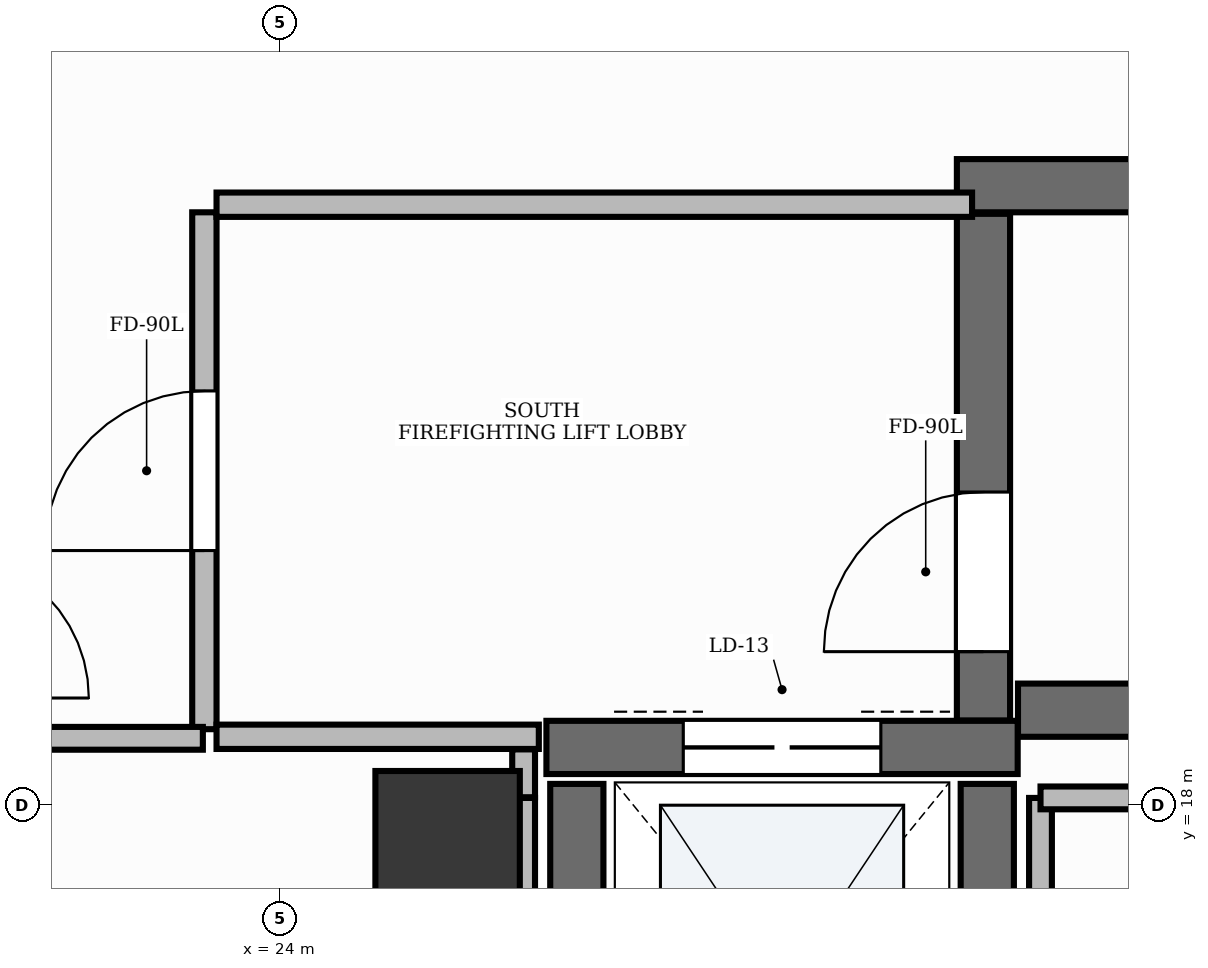
"""IFC4 building model, lengths in metres.
Left out: names, types, materials, properties, quantities, classifications, styles, units other than length and angle.
Written with IfcOpenShell. Run it as: python <this file> out.ifc"""

import sys

from ifc_helpers import new_model, si_unit, direction, frame, frame_2d, origin, origin_2d, place, context, subcontext, project, spatial, rectangle, extrude, element, fill, save


model = new_model("IFC4")
c1 = context("Model", 3, precision=1e-05, world=origin(), true_north=direction((0.0, 1.0)))
c2 = subcontext(c1, "Body", "Model", "MODEL_VIEW")
j1 = project(units=[si_unit("LENGTHUNIT", "METRE"), si_unit("PLANEANGLEUNIT", "RADIAN")], contexts=[c1])
p1 = place(None, origin())
s1 = spatial("IfcSite", under=j1, at=p1, CompositionType="ELEMENT")
p2 = place(p1, origin())
s2 = spatial("IfcBuilding", under=s1, at=p2, CompositionType="ELEMENT")
p3 = place(p2, frame((0.0, 0.0, 322.8)))
s3 = spatial("IfcBuildingStorey", under=s2, at=p3, CompositionType="ELEMENT", Elevation=322.8)
p4 = place(p3, frame((28.852, 18.625, 0.0), z_axis=(0.0, 0.0, 1.0), x_axis=(1.0, 0.0, 0.0)))
e1 = element("IfcWall", 1, at=p4, inside=s3, PredefinedType="SHEAR", context=c2, shape_type="SweptSolid", body=[
    extrude(rectangle(XDim=8.148, YDim=0.35, at=frame_2d((4.074, 0.0))), origin(), (0.0, 0.0, 1.0), 3.9),
])
p5 = place(p3, frame((28.45, 22.075, 0.0), z_axis=(0.0, 0.0, 1.0), x_axis=(1.0, 0.0, 0.0)))
e2 = element("IfcWall", 2, at=p5, inside=s3, PredefinedType="SHEAR", context=c2, shape_type="SweptSolid", body=[
    extrude(rectangle(XDim=8.55, YDim=0.35, at=frame_2d((4.275, 0.0))), origin(), (0.0, 0.0, 1.0), 3.9),
])
p6 = place(p3, frame((28.625, 18.557, 0.0), z_axis=(0.0, 0.0, 1.0), x_axis=(0.0, 1.0, 0.0)))
e3 = element("IfcWall", 3, at=p6, inside=s3, PredefinedType="SHEAR", context=c2, shape_type="SweptSolid", body=[
    extrude(rectangle(XDim=3.333, YDim=0.35, at=frame_2d((1.667, 0.0))), origin(), (0.0, 0.0, 1.0), 3.9),
])
p7 = place(p6, frame((0.453, 0.0, 0.0)))
e4 = element("IfcOpeningElement", 4, at=p7, cuts=e3, PredefinedType="OPENING", context=c2, shape_type="SweptSolid", body=[
    extrude(rectangle(XDim=1.05, YDim=2.15, at=frame_2d((0.525, 1.075))), frame((0.0, 0.19, 0.0), z_axis=(0.0, -1.0, 0.0), x_axis=(1.0, 0.0, 0.0)), (0.0, 0.0, 1.0), 0.38),
])
p8 = place(p3, frame((25.75, 18.38, 0.0), z_axis=(0.0, 0.0, 1.0), x_axis=(1.0, 0.0, 0.0)))
e5 = element("IfcWall", 5, at=p8, inside=s3, PredefinedType="SHEAR", context=c2, shape_type="SweptSolid", body=[
    extrude(rectangle(XDim=3.1, YDim=0.35, at=frame_2d((1.55, 0.0))), origin(), (0.0, 0.0, 1.0), 3.9),
])
p9 = place(p8, frame((0.9, 0.0, 0.0)))
e6 = element("IfcOpeningElement", 6, at=p9, cuts=e5, PredefinedType="OPENING", context=c2, shape_type="SweptSolid", body=[
    extrude(rectangle(XDim=1.3, YDim=2.2, at=frame_2d((0.65, 1.1))), frame((0.0, 0.19, 0.0), z_axis=(0.0, -1.0, 0.0), x_axis=(1.0, 0.0, 0.0)), (0.0, 0.0, 1.0), 0.38),
])
for number, where, z_axis, x_axis in (
    (7, (25.95, 15.44, 0.0), (0.0, 0.0, 1.0), (0.0, 1.0, 0.0)),
    (8, (28.65, 15.44, 0.0), (0.0, 0.0, 1.0), (0.0, 1.0, 0.0)),
):
    element("IfcWall", number, at=place(p3, frame(where, z_axis=z_axis, x_axis=x_axis)), inside=s3, PredefinedType="SHEAR", context=c2, shape_type="SweptSolid", body=[
        extrude(rectangle(XDim=2.7, YDim=0.35, at=frame_2d((1.35, 0.0))), origin(), (0.0, 0.0, 1.0), 3.9),
    ])
p10 = place(p3, frame((25.1, 17.75, -0.0), z_axis=(0.0, 0.0, 1.0), x_axis=(1.0, 0.0, 0.0)))
e9 = element("IfcColumn", 9, at=p10, inside=s3, PredefinedType="PILASTER", context=c2, shape_type="SweptSolid", body=[
    extrude(rectangle(XDim=0.95, YDim=0.95, at=origin_2d()), origin(), (0.0, 0.0, 1.0), 3.901),
])
p11 = place(p3, frame((23.5, 18.5, 0.0), z_axis=(0.0, 0.0, 1.0), x_axis=(0.0, 1.0, 0.0)))
e10 = element("IfcWall", 10, at=p11, inside=s3, PredefinedType="PARTITIONING", context=c2, shape_type="SweptSolid", body=[
    extrude(rectangle(XDim=3.4, YDim=0.16, at=frame_2d((1.7, 0.0))), origin(), (0.0, 0.0, 1.0), 2.22),
])
p12 = place(p11, frame((1.175, 0.0, 0.0)))
e11 = element("IfcOpeningElement", 11, at=p12, cuts=e10, PredefinedType="OPENING", context=c2, shape_type="SweptSolid", body=[
    extrude(rectangle(XDim=1.05, YDim=2.15, at=frame_2d((0.525, 1.075))), frame((0.0, 0.095, 0.0), z_axis=(0.0, -1.0, 0.0), x_axis=(1.0, 0.0, 0.0)), (0.0, 0.0, 1.0), 0.19),
])
p13 = place(p3, frame((23.58, 21.95, 0.0), z_axis=(0.0, 0.0, 1.0), x_axis=(1.0, 0.0, 0.0)))
e12 = element("IfcWall", 12, at=p13, inside=s3, PredefinedType="PARTITIONING", context=c2, shape_type="SweptSolid", body=[
    extrude(rectangle(XDim=4.97, YDim=0.16, at=frame_2d((2.485, 0.0))), origin(), (0.0, 0.0, 1.0), 2.22),
])
p14 = place(p3, frame((23.58, 18.45, 0.0), z_axis=(0.0, 0.0, 1.0), x_axis=(1.0, 0.0, 0.0)))
e13 = element("IfcWall", 13, at=p14, inside=s3, PredefinedType="PARTITIONING", context=c2, shape_type="SweptSolid", body=[
    extrude(rectangle(XDim=2.12, YDim=0.16, at=frame_2d((1.06, 0.0))), origin(), (0.0, 0.0, 1.0), 2.22),
])
p15 = place(p3, frame((21.8, 18.44, 0.0), z_axis=(0.0, 0.0, 1.0), x_axis=(1.0, 0.0, 0.0)))
e14 = element("IfcWall", 14, at=p15, inside=s3, PredefinedType="PARTITIONING", context=c2, shape_type="SweptSolid", body=[
    extrude(rectangle(XDim=1.69, YDim=0.15, at=frame_2d((0.845, 0.0))), origin(), (0.0, 0.0, 1.0), 2.22),
])
p16 = place(p3, frame((25.6, 18.367, 0.0), z_axis=(0.0, 0.0, 1.0), x_axis=(0.0, -1.0, 0.0)))
e15 = element("IfcWall", 15, at=p16, inside=s3, PredefinedType="PARTITIONING", context=c2, shape_type="SweptSolid", body=[
    extrude(rectangle(XDim=0.315, YDim=0.15, at=frame_2d((0.157, 0.0))), origin(), (0.0, 0.0, 1.0), 2.22),
])
p17 = place(p3, frame((25.6, 18.048, 0.0), z_axis=(0.0, 0.0, 1.0), x_axis=(0.0, -1.0, 0.0)))
e16 = element("IfcWall", 16, at=p17, inside=s3, PredefinedType="PARTITIONING", context=c2, shape_type="SweptSolid", body=[
    extrude(rectangle(XDim=1.879, YDim=0.15, at=frame_2d((0.939, 0.0))), origin(), (0.0, 0.0, 1.0), 2.22),
])
p18 = place(p3, frame((29.0, 14.954, 0.0), z_axis=(0.0, 0.0, 1.0), x_axis=(0.0, 1.0, 0.0)))
e17 = element("IfcWall", 17, at=p18, inside=s3, PredefinedType="PARTITIONING", context=c2, shape_type="SweptSolid", body=[
    extrude(rectangle(XDim=3.094, YDim=0.15, at=frame_2d((1.547, 0.0))), origin(), (0.0, 0.0, 1.0), 2.22),
])
p19 = place(p3, frame((29.0, 18.048, 0.0), z_axis=(0.0, 0.0, 1.0), x_axis=(1.0, 0.0, 0.0)))
e18 = element("IfcWall", 18, at=p19, inside=s3, PredefinedType="PARTITIONING", context=c2, shape_type="SweptSolid", body=[
    extrude(rectangle(XDim=0.95, YDim=0.15, at=frame_2d((0.475, 0.0))), origin(), (0.0, 0.0, 1.0), 2.22),
])
p20 = place(p7, origin())
e19 = element("IfcDoor", 19, at=p20, inside=s3, OperationType="SINGLE_SWING_LEFT", PredefinedType="DOOR", context=c2, shape_type="SweptSolid", body=[
    extrude(rectangle(XDim=1.05, YDim=2.15, at=frame_2d((0.525, 1.075))), frame((0.0, 0.025, 0.0), z_axis=(0.0, -1.0, 0.0), x_axis=(1.0, 0.0, 0.0)), (0.0, 0.0, 1.0), 0.05),
])
fill(e4, e19)
p21 = place(p9, origin())
e20 = element("IfcDoor", 20, at=p21, inside=s3, OperationType="DOUBLE_DOOR_SLIDING", PredefinedType="DOOR", context=c2, shape_type="SweptSolid", body=[
    extrude(rectangle(XDim=1.3, YDim=2.2, at=frame_2d((0.65, 1.1))), frame((0.0, 0.025, 0.0), z_axis=(0.0, -1.0, 0.0), x_axis=(1.0, 0.0, 0.0)), (0.0, 0.0, 1.0), 0.05),
])
fill(e6, e20)
p22 = place(p12, origin())
e21 = element("IfcDoor", 21, at=p22, inside=s3, OperationType="SINGLE_SWING_LEFT", PredefinedType="DOOR", context=c2, shape_type="SweptSolid", body=[
    extrude(rectangle(XDim=1.05, YDim=2.15, at=frame_2d((0.525, 1.075))), frame((0.0, 0.025, 0.0), z_axis=(0.0, -1.0, 0.0), x_axis=(1.0, 0.0, 0.0)), (0.0, 0.0, 1.0), 0.05),
])
fill(e11, e21)
save(model, sys.argv[1])
